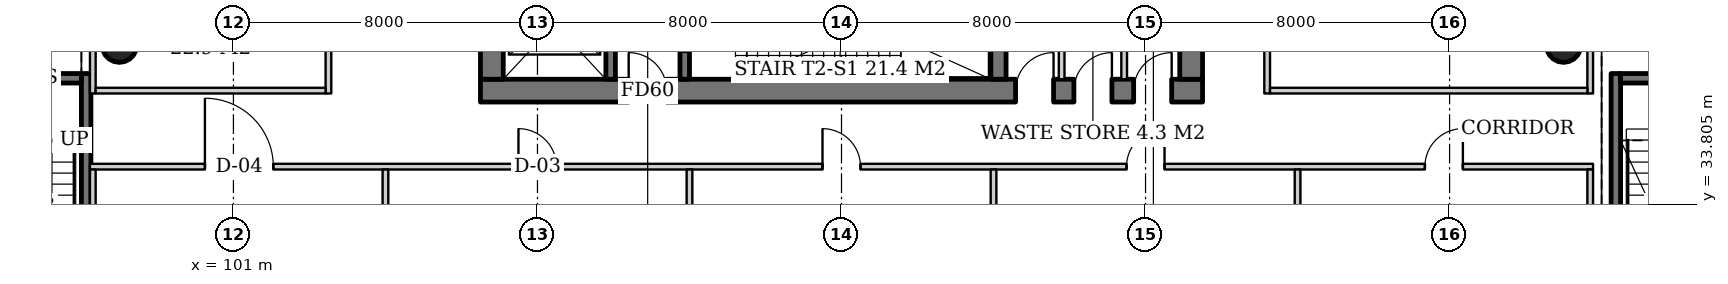
"""IFC4 building model, lengths in metres.
Left out: names, types, materials, properties, quantities, classifications, styles, units other than length and angle.
Written with IfcOpenShell. Run it as: python <this file> out.ifc"""

import sys

from ifc_helpers import new_model, si_unit, direction, frame, frame_2d, origin, origin_2d, place, context, subcontext, project, spatial, rectangle, hollow_circle, extrude, element, fill, save


model = new_model("IFC4")
c1 = context("Model", 3, precision=1e-05, world=origin(), true_north=direction((0.0, 1.0)))
c2 = subcontext(c1, "Body", "Model", "MODEL_VIEW")
j1 = project(units=[si_unit("LENGTHUNIT", "METRE"), si_unit("PLANEANGLEUNIT", "RADIAN")], contexts=[c1])
p1 = place(None, origin())
s1 = spatial("IfcSite", under=j1, at=p1, CompositionType="ELEMENT")
p2 = place(p1, origin())
s2 = spatial("IfcBuilding", under=s1, at=p2, CompositionType="ELEMENT")
p3 = place(p2, frame((0.0, 0.0, 11.0)))
s3 = spatial("IfcBuildingStorey", under=s2, at=p3, CompositionType="ELEMENT", Elevation=11.0)
for number, where, z_axis, x_axis in (
    (1, (136.0, 38.0, 0.0), (0.0, 0.0, 1.0), (1.0, 0.0, 0.0)),
    (2, (98.0, 38.0, 0.0), (0.0, 0.0, 1.0), (1.0, 0.0, 0.0)),
):
    element("IfcColumn", number, at=place(p3, frame(where, z_axis=z_axis, x_axis=x_axis)), inside=s3, PredefinedType="COLUMN", context=c2, shape_type="SweptSolid", body=[
        extrude(hollow_circle(Radius=0.457, WallThickness=0.03, at=origin_2d()), origin(), (0.0, 0.0, 1.0), 5.0),
    ])
p4 = place(p3, frame((107.5, 36.8, 0.0), z_axis=(0.0, 0.0, 1.0), x_axis=(1.0, 0.0, 0.0)))
e3 = element("IfcWall", 3, at=p4, inside=s3, PredefinedType="SHEAR", context=c2, shape_type="SweptSolid", body=[
    extrude(rectangle(XDim=19.0, YDim=0.6, at=frame_2d((9.5, 0.0))), origin(), (0.0, 0.0, 1.0), 5.0),
])
p5 = place(p4, frame((3.9, 0.0, 0.0)))
e4 = element("IfcOpeningElement", 4, at=p5, cuts=e3, PredefinedType="OPENING", context=c2, shape_type="SweptSolid", body=[
    extrude(rectangle(XDim=1.0, YDim=2.1, at=frame_2d((0.5, 1.05))), frame((0.0, 0.31, 0.0), z_axis=(0.0, -1.0, 0.0), x_axis=(1.0, 0.0, 0.0)), (0.0, 0.0, 1.0), 0.62),
])
p6 = place(p4, frame((14.08, 0.0, 0.0)))
e5 = element("IfcOpeningElement", 5, at=p6, cuts=e3, PredefinedType="OPENING", context=c2, shape_type="SweptSolid", body=[
    extrude(rectangle(XDim=1.0, YDim=2.1, at=frame_2d((0.5, 1.05))), frame((0.0, 0.31, 0.0), z_axis=(0.0, -1.0, 0.0), x_axis=(1.0, 0.0, 0.0)), (0.0, 0.0, 1.0), 0.62),
])
p7 = place(p4, frame((15.615, 0.0, 0.0)))
e6 = element("IfcOpeningElement", 6, at=p7, cuts=e3, PredefinedType="OPENING", context=c2, shape_type="SweptSolid", body=[
    extrude(rectangle(XDim=1.0, YDim=2.1, at=frame_2d((0.5, 1.05))), frame((0.0, 0.31, 0.0), z_axis=(0.0, -1.0, 0.0), x_axis=(1.0, 0.0, 0.0)), (0.0, 0.0, 1.0), 0.62),
])
p8 = place(p4, frame((17.188, 0.0, 0.0)))
e7 = element("IfcOpeningElement", 7, at=p8, cuts=e3, PredefinedType="OPENING", context=c2, shape_type="SweptSolid", body=[
    extrude(rectangle(XDim=1.0, YDim=2.1, at=frame_2d((0.5, 1.05))), frame((0.0, 0.31, 0.0), z_axis=(0.0, -1.0, 0.0), x_axis=(1.0, 0.0, 0.0)), (0.0, 0.0, 1.0), 0.62),
])
p9 = place(p3, frame((107.8, 37.1, 0.0), z_axis=(0.0, 0.0, 1.0), x_axis=(0.0, 1.0, 0.0)))
e8 = element("IfcWall", 8, at=p9, inside=s3, PredefinedType="SHEAR", context=c2, shape_type="SweptSolid", body=[
    extrude(rectangle(XDim=17.8, YDim=0.6, at=frame_2d((8.9, 0.0))), origin(), (0.0, 0.0, 1.0), 5.0),
])
p10 = place(p9, frame((8.0, 0.0, 0.0)))
e9 = element("IfcOpeningElement", 9, at=p10, cuts=e8, PredefinedType="OPENING", context=c2, shape_type="SweptSolid", body=[
    extrude(rectangle(XDim=1.8, YDim=2.4, at=frame_2d((0.9, 1.2))), frame((0.0, 0.31, 0.0), z_axis=(0.0, -1.0, 0.0), x_axis=(1.0, 0.0, 0.0)), (0.0, 0.0, 1.0), 0.62),
])
p11 = place(p3, frame((126.2, 37.1, 0.0), z_axis=(0.0, 0.0, 1.0), x_axis=(0.0, 1.0, 0.0)))
e10 = element("IfcWall", 10, at=p11, inside=s3, PredefinedType="SHEAR", context=c2, shape_type="SweptSolid", body=[
    extrude(rectangle(XDim=17.8, YDim=0.6, at=frame_2d((8.9, 0.0))), origin(), (0.0, 0.0, 1.0), 5.0),
])
p12 = place(p11, frame((8.0, 0.0, 0.0)))
e11 = element("IfcOpeningElement", 11, at=p12, cuts=e10, PredefinedType="OPENING", context=c2, shape_type="SweptSolid", body=[
    extrude(rectangle(XDim=1.8, YDim=2.4, at=frame_2d((0.9, 1.2))), frame((0.0, 0.31, 0.0), z_axis=(0.0, -1.0, 0.0), x_axis=(1.0, 0.0, 0.0)), (0.0, 0.0, 1.0), 0.62),
])
p13 = place(p3, frame((121.13, 37.1, 0.0), z_axis=(0.0, 0.0, 1.0), x_axis=(0.0, 1.0, 0.0)))
e12 = element("IfcWall", 12, at=p13, inside=s3, PredefinedType="SHEAR", context=c2, shape_type="SweptSolid", body=[
    extrude(rectangle(XDim=2.9, YDim=0.4, at=frame_2d((1.45, 0.0))), origin(), (0.0, 0.0, 1.0), 5.0),
])
p14 = place(p3, frame((110.925, 37.1, 0.0), z_axis=(0.0, 0.0, 1.0), x_axis=(0.0, 1.0, 0.0)))
e13 = element("IfcWall", 13, at=p14, inside=s3, PredefinedType="SHEAR", context=c2, shape_type="SweptSolid", body=[
    extrude(rectangle(XDim=2.9, YDim=0.25, at=frame_2d((1.45, 0.0))), origin(), (0.0, 0.0, 1.0), 5.0),
])
p15 = place(p14, frame((0.8, 0.0, 0.0)))
e14 = element("IfcOpeningElement", 14, at=p15, cuts=e13, PredefinedType="OPENING", context=c2, shape_type="SweptSolid", body=[
    extrude(rectangle(XDim=1.3, YDim=2.2, at=frame_2d((0.65, 1.1))), frame((0.0, 0.135, 0.0), z_axis=(0.0, -1.0, 0.0), x_axis=(1.0, 0.0, 0.0)), (0.0, 0.0, 1.0), 0.27),
])
p16 = place(p3, frame((112.875, 37.1, 0.0), z_axis=(0.0, 0.0, 1.0), x_axis=(0.0, 1.0, 0.0)))
e15 = element("IfcWall", 15, at=p16, inside=s3, PredefinedType="SHEAR", context=c2, shape_type="SweptSolid", body=[
    extrude(rectangle(XDim=2.9, YDim=0.25, at=frame_2d((1.45, 0.0))), origin(), (0.0, 0.0, 1.0), 5.0),
])
p17 = place(p16, frame((0.75, 0.0, 0.0)))
e16 = element("IfcOpeningElement", 16, at=p17, cuts=e15, PredefinedType="OPENING", context=c2, shape_type="SweptSolid", body=[
    extrude(rectangle(XDim=1.2, YDim=2.1, at=frame_2d((0.6, 1.05))), frame((0.0, 0.135, 0.0), z_axis=(0.0, -1.0, 0.0), x_axis=(1.0, 0.0, 0.0)), (0.0, 0.0, 1.0), 0.27),
])
for number, where, z_axis, x_axis in (
    (17, (122.792, 37.1, 0.0), (0.0, 0.0, 1.0), (0.0, 1.0, 0.0)),
    (18, (124.438, 37.1, 0.0), (0.0, 0.0, 1.0), (0.0, 1.0, 0.0)),
):
    element("IfcWall", number, at=place(p3, frame(where, z_axis=z_axis, x_axis=x_axis)), inside=s3, PredefinedType="SOLIDWALL", context=c2, shape_type="SweptSolid", body=[
        extrude(rectangle(XDim=2.9, YDim=0.15, at=frame_2d((1.45, 0.0))), origin(), (0.0, 0.0, 1.0), 4.7),
    ])
p18 = place(p3, frame((97.125, 28.75, 0.0), z_axis=(0.0, 0.0, 1.0), x_axis=(0.0, 1.0, 0.0)))
e19 = element("IfcWall", 19, at=p18, inside=s3, PredefinedType="SOLIDWALL", context=c2, shape_type="SweptSolid", body=[
    extrude(rectangle(XDim=8.5, YDim=0.25, at=frame_2d((4.25, 0.0))), origin(), (0.0, 0.0, 1.0), 4.7),
])
p19 = place(p3, frame((94.0, 37.125, 0.0), z_axis=(0.0, 0.0, 1.0), x_axis=(1.0, 0.0, 0.0)))
e20 = element("IfcWall", 20, at=p19, inside=s3, PredefinedType="SOLIDWALL", context=c2, shape_type="SweptSolid", body=[
    extrude(rectangle(XDim=3.0, YDim=0.25, at=frame_2d((1.5, 0.0))), origin(), (0.0, 0.0, 1.0), 4.7),
])
p20 = place(p19, frame((0.9, 0.0, 0.0)))
e21 = element("IfcOpeningElement", 21, at=p20, cuts=e20, PredefinedType="OPENING", context=c2, shape_type="SweptSolid", body=[
    extrude(rectangle(XDim=1.2, YDim=2.1, at=frame_2d((0.6, 1.05))), frame((0.0, 0.135, 0.0), z_axis=(0.0, -1.0, 0.0), x_axis=(1.0, 0.0, 0.0)), (0.0, 0.0, 1.0), 0.27),
])
p21 = place(p3, frame((137.375, 28.75, 0.0), z_axis=(0.0, 0.0, 1.0), x_axis=(0.0, 1.0, 0.0)))
e22 = element("IfcWall", 22, at=p21, inside=s3, PredefinedType="SOLIDWALL", context=c2, shape_type="SweptSolid", body=[
    extrude(rectangle(XDim=8.5, YDim=0.25, at=frame_2d((4.25, 0.0))), origin(), (0.0, 0.0, 1.0), 4.7),
])
p22 = place(p3, frame((137.5, 37.125, 0.0), z_axis=(0.0, 0.0, 1.0), x_axis=(1.0, 0.0, 0.0)))
e23 = element("IfcWall", 23, at=p22, inside=s3, PredefinedType="SOLIDWALL", context=c2, shape_type="SweptSolid", body=[
    extrude(rectangle(XDim=3.0, YDim=0.25, at=frame_2d((1.5, 0.0))), origin(), (0.0, 0.0, 1.0), 4.7),
])
p23 = place(p22, frame((0.9, 0.0, 0.0)))
e24 = element("IfcOpeningElement", 24, at=p23, cuts=e23, PredefinedType="OPENING", context=c2, shape_type="SweptSolid", body=[
    extrude(rectangle(XDim=1.2, YDim=2.1, at=frame_2d((0.6, 1.05))), frame((0.0, 0.135, 0.0), z_axis=(0.0, -1.0, 0.0), x_axis=(1.0, 0.0, 0.0)), (0.0, 0.0, 1.0), 0.27),
])
p24 = place(p3, frame((97.225, 34.8, 0.0), z_axis=(0.0, 0.0, 1.0), x_axis=(1.0, 0.0, 0.0)))
e25 = element("IfcWall", 25, at=p24, inside=s3, PredefinedType="PARTITIONING", context=c2, shape_type="SweptSolid", body=[
    extrude(rectangle(XDim=39.55, YDim=0.15, at=frame_2d((19.775, 0.0))), origin(), (0.0, 0.0, 1.0), 3.9),
])
p25 = place(p24, frame((3.025, 0.0, 0.0)))
e26 = element("IfcOpeningElement", 26, at=p25, cuts=e25, PredefinedType="OPENING", context=c2, shape_type="SweptSolid", body=[
    extrude(rectangle(XDim=1.8, YDim=2.4, at=frame_2d((0.9, 1.2))), frame((0.0, 0.085, 0.0), z_axis=(0.0, -1.0, 0.0), x_axis=(1.0, 0.0, 0.0)), (0.0, 0.0, 1.0), 0.17),
])
p26 = place(p24, frame((11.275, 0.0, 0.0)))
e27 = element("IfcOpeningElement", 27, at=p26, cuts=e25, PredefinedType="OPENING", context=c2, shape_type="SweptSolid", body=[
    extrude(rectangle(XDim=1.0, YDim=2.1, at=frame_2d((0.5, 1.05))), frame((0.0, 0.085, 0.0), z_axis=(0.0, -1.0, 0.0), x_axis=(1.0, 0.0, 0.0)), (0.0, 0.0, 1.0), 0.17),
])
p27 = place(p24, frame((19.275, 0.0, 0.0)))
e28 = element("IfcOpeningElement", 28, at=p27, cuts=e25, PredefinedType="OPENING", context=c2, shape_type="SweptSolid", body=[
    extrude(rectangle(XDim=1.0, YDim=2.1, at=frame_2d((0.5, 1.05))), frame((0.0, 0.085, 0.0), z_axis=(0.0, -1.0, 0.0), x_axis=(1.0, 0.0, 0.0)), (0.0, 0.0, 1.0), 0.17),
])
p28 = place(p24, frame((27.275, 0.0, 0.0)))
e29 = element("IfcOpeningElement", 29, at=p28, cuts=e25, PredefinedType="OPENING", context=c2, shape_type="SweptSolid", body=[
    extrude(rectangle(XDim=1.0, YDim=2.1, at=frame_2d((0.5, 1.05))), frame((0.0, 0.085, 0.0), z_axis=(0.0, -1.0, 0.0), x_axis=(1.0, 0.0, 0.0)), (0.0, 0.0, 1.0), 0.17),
])
p29 = place(p24, frame((35.125, 0.0, 0.0)))
e30 = element("IfcOpeningElement", 30, at=p29, cuts=e25, PredefinedType="OPENING", context=c2, shape_type="SweptSolid", body=[
    extrude(rectangle(XDim=1.0, YDim=2.1, at=frame_2d((0.5, 1.05))), frame((0.0, 0.085, 0.0), z_axis=(0.0, -1.0, 0.0), x_axis=(1.0, 0.0, 0.0)), (0.0, 0.0, 1.0), 0.17),
])
for number, where, z_axis, x_axis in (
    (31, (97.3, 21.3, 0.0), (0.0, 0.0, 1.0), (0.0, 1.0, 0.0)),
    (32, (136.7, 21.3, 0.0), (0.0, 0.0, 1.0), (0.0, 1.0, 0.0)),
):
    element("IfcWall", number, at=place(p3, frame(where, z_axis=z_axis, x_axis=x_axis)), inside=s3, PredefinedType="PARTITIONING", context=c2, shape_type="SweptSolid", body=[
        extrude(rectangle(XDim=13.425, YDim=0.15, at=frame_2d((6.712, 0.0))), origin(), (0.0, 0.0, 1.0), 4.7),
    ])
for number, where, z_axis, x_axis in (
    (33, (105.0, 21.3, 0.0), (0.0, 0.0, 1.0), (0.0, 1.0, 0.0)),
    (34, (113.0, 21.3, 0.0), (0.0, 0.0, 1.0), (0.0, 1.0, 0.0)),
    (35, (121.0, 21.3, 0.0), (0.0, 0.0, 1.0), (0.0, 1.0, 0.0)),
    (36, (129.0, 21.3, 0.0), (0.0, 0.0, 1.0), (0.0, 1.0, 0.0)),
):
    element("IfcWall", number, at=place(p3, frame(where, z_axis=z_axis, x_axis=x_axis)), inside=s3, PredefinedType="PARTITIONING", context=c2, shape_type="SweptSolid", body=[
        extrude(rectangle(XDim=13.425, YDim=0.15, at=frame_2d((6.712, 0.0))), origin(), (0.0, 0.0, 1.0), 4.15),
    ])
p30 = place(p3, frame((97.3, 36.725, 0.0), z_axis=(0.0, 0.0, 1.0), x_axis=(0.0, 1.0, 0.0)))
e37 = element("IfcWall", 37, at=p30, inside=s3, PredefinedType="PARTITIONING", context=c2, shape_type="SweptSolid", body=[
    extrude(rectangle(XDim=20.475, YDim=0.15, at=frame_2d((10.237, 0.0))), origin(), (0.0, 0.0, 1.0), 4.7),
])
p31 = place(p3, frame((103.5, 36.725, 0.0), z_axis=(0.0, 0.0, 1.0), x_axis=(0.0, 1.0, 0.0)))
e38 = element("IfcWall", 38, at=p31, inside=s3, PredefinedType="PARTITIONING", context=c2, shape_type="SweptSolid", body=[
    extrude(rectangle(XDim=20.475, YDim=0.15, at=frame_2d((10.237, 0.0))), origin(), (0.0, 0.0, 1.0), 3.9),
])
p32 = place(p31, frame((1.425, 0.0, 0.0)))
e39 = element("IfcOpeningElement", 39, at=p32, cuts=e38, PredefinedType="OPENING", context=c2, shape_type="SweptSolid", body=[
    extrude(rectangle(XDim=1.0, YDim=2.1, at=frame_2d((0.5, 1.05))), frame((0.0, 0.085, 0.0), z_axis=(0.0, -1.0, 0.0), x_axis=(1.0, 0.0, 0.0)), (0.0, 0.0, 1.0), 0.17),
])
p33 = place(p31, frame((5.275, 0.0, 0.0)))
e40 = element("IfcOpeningElement", 40, at=p33, cuts=e38, PredefinedType="OPENING", context=c2, shape_type="SweptSolid", body=[
    extrude(rectangle(XDim=1.0, YDim=2.1, at=frame_2d((0.5, 1.05))), frame((0.0, 0.085, 0.0), z_axis=(0.0, -1.0, 0.0), x_axis=(1.0, 0.0, 0.0)), (0.0, 0.0, 1.0), 0.17),
])
p34 = place(p31, frame((9.775, 0.0, 0.0)))
e41 = element("IfcOpeningElement", 41, at=p34, cuts=e38, PredefinedType="OPENING", context=c2, shape_type="SweptSolid", body=[
    extrude(rectangle(XDim=1.0, YDim=2.1, at=frame_2d((0.5, 1.05))), frame((0.0, 0.085, 0.0), z_axis=(0.0, -1.0, 0.0), x_axis=(1.0, 0.0, 0.0)), (0.0, 0.0, 1.0), 0.17),
])
p35 = place(p31, frame((14.275, 0.0, 0.0)))
e42 = element("IfcOpeningElement", 42, at=p35, cuts=e38, PredefinedType="OPENING", context=c2, shape_type="SweptSolid", body=[
    extrude(rectangle(XDim=1.0, YDim=2.1, at=frame_2d((0.5, 1.05))), frame((0.0, 0.085, 0.0), z_axis=(0.0, -1.0, 0.0), x_axis=(1.0, 0.0, 0.0)), (0.0, 0.0, 1.0), 0.17),
])
p36 = place(p31, frame((18.125, 0.0, 0.0)))
e43 = element("IfcOpeningElement", 43, at=p36, cuts=e38, PredefinedType="OPENING", context=c2, shape_type="SweptSolid", body=[
    extrude(rectangle(XDim=1.0, YDim=2.1, at=frame_2d((0.5, 1.05))), frame((0.0, 0.085, 0.0), z_axis=(0.0, -1.0, 0.0), x_axis=(1.0, 0.0, 0.0)), (0.0, 0.0, 1.0), 0.17),
])
p37 = place(p3, frame((97.375, 36.8, 0.0), z_axis=(0.0, 0.0, 1.0), x_axis=(1.0, 0.0, 0.0)))
e44 = element("IfcWall", 44, at=p37, inside=s3, PredefinedType="PARTITIONING", context=c2, shape_type="SweptSolid", body=[
    extrude(rectangle(XDim=6.05, YDim=0.15, at=frame_2d((3.025, 0.0))), origin(), (0.0, 0.0, 1.0), 4.15),
])
p38 = place(p3, frame((128.2, 36.725, 0.0), z_axis=(0.0, 0.0, 1.0), x_axis=(0.0, 1.0, 0.0)))
e45 = element("IfcWall", 45, at=p38, inside=s3, PredefinedType="PARTITIONING", context=c2, shape_type="SweptSolid", body=[
    extrude(rectangle(XDim=20.475, YDim=0.15, at=frame_2d((10.237, 0.0))), origin(), (0.0, 0.0, 1.0), 3.9),
])
p39 = place(p38, frame((1.425, 0.0, 0.0)))
e46 = element("IfcOpeningElement", 46, at=p39, cuts=e45, PredefinedType="OPENING", context=c2, shape_type="SweptSolid", body=[
    extrude(rectangle(XDim=1.0, YDim=2.1, at=frame_2d((0.5, 1.05))), frame((0.0, 0.085, 0.0), z_axis=(0.0, -1.0, 0.0), x_axis=(1.0, 0.0, 0.0)), (0.0, 0.0, 1.0), 0.17),
])
p40 = place(p38, frame((5.275, 0.0, 0.0)))
e47 = element("IfcOpeningElement", 47, at=p40, cuts=e45, PredefinedType="OPENING", context=c2, shape_type="SweptSolid", body=[
    extrude(rectangle(XDim=1.0, YDim=2.1, at=frame_2d((0.5, 1.05))), frame((0.0, 0.085, 0.0), z_axis=(0.0, -1.0, 0.0), x_axis=(1.0, 0.0, 0.0)), (0.0, 0.0, 1.0), 0.17),
])
p41 = place(p38, frame((9.775, 0.0, 0.0)))
e48 = element("IfcOpeningElement", 48, at=p41, cuts=e45, PredefinedType="OPENING", context=c2, shape_type="SweptSolid", body=[
    extrude(rectangle(XDim=1.0, YDim=2.1, at=frame_2d((0.5, 1.05))), frame((0.0, 0.085, 0.0), z_axis=(0.0, -1.0, 0.0), x_axis=(1.0, 0.0, 0.0)), (0.0, 0.0, 1.0), 0.17),
])
p42 = place(p38, frame((14.275, 0.0, 0.0)))
e49 = element("IfcOpeningElement", 49, at=p42, cuts=e45, PredefinedType="OPENING", context=c2, shape_type="SweptSolid", body=[
    extrude(rectangle(XDim=1.0, YDim=2.1, at=frame_2d((0.5, 1.05))), frame((0.0, 0.085, 0.0), z_axis=(0.0, -1.0, 0.0), x_axis=(1.0, 0.0, 0.0)), (0.0, 0.0, 1.0), 0.17),
])
p43 = place(p38, frame((18.125, 0.0, 0.0)))
e50 = element("IfcOpeningElement", 50, at=p43, cuts=e45, PredefinedType="OPENING", context=c2, shape_type="SweptSolid", body=[
    extrude(rectangle(XDim=1.0, YDim=2.1, at=frame_2d((0.5, 1.05))), frame((0.0, 0.085, 0.0), z_axis=(0.0, -1.0, 0.0), x_axis=(1.0, 0.0, 0.0)), (0.0, 0.0, 1.0), 0.17),
])
p44 = place(p3, frame((136.7, 36.725, 0.0), z_axis=(0.0, 0.0, 1.0), x_axis=(0.0, 1.0, 0.0)))
e51 = element("IfcWall", 51, at=p44, inside=s3, PredefinedType="PARTITIONING", context=c2, shape_type="SweptSolid", body=[
    extrude(rectangle(XDim=20.475, YDim=0.15, at=frame_2d((10.237, 0.0))), origin(), (0.0, 0.0, 1.0), 4.7),
])
p45 = place(p3, frame((128.275, 36.8, 0.0), z_axis=(0.0, 0.0, 1.0), x_axis=(1.0, 0.0, 0.0)))
e52 = element("IfcWall", 52, at=p45, inside=s3, PredefinedType="PARTITIONING", context=c2, shape_type="SweptSolid", body=[
    extrude(rectangle(XDim=8.35, YDim=0.15, at=frame_2d((4.175, 0.0))), origin(), (0.0, 0.0, 1.0), 3.9),
])
p46 = place(p5, origin())
e53 = element("IfcDoor", 53, at=p46, inside=s3, OperationType="SINGLE_SWING_LEFT", PredefinedType="DOOR", context=c2, shape_type="SweptSolid", body=[
    extrude(rectangle(XDim=1.0, YDim=2.1, at=frame_2d((0.5, 1.05))), frame((0.0, 0.025, 0.0), z_axis=(0.0, -1.0, 0.0), x_axis=(1.0, 0.0, 0.0)), (0.0, 0.0, 1.0), 0.05),
])
fill(e4, e53)
p47 = place(p6, origin())
e54 = element("IfcDoor", 54, at=p47, inside=s3, OperationType="SINGLE_SWING_RIGHT", PredefinedType="DOOR", context=c2, shape_type="SweptSolid", body=[
    extrude(rectangle(XDim=1.0, YDim=2.1, at=frame_2d((0.5, 1.05))), frame((0.0, 0.29, 0.0), z_axis=(0.0, -1.0, 0.0), x_axis=(1.0, 0.0, 0.0)), (0.0, 0.0, 1.0), 0.05),
])
fill(e5, e54)
p48 = place(p7, origin())
e55 = element("IfcDoor", 55, at=p48, inside=s3, OperationType="SINGLE_SWING_RIGHT", PredefinedType="DOOR", context=c2, shape_type="SweptSolid", body=[
    extrude(rectangle(XDim=1.0, YDim=2.1, at=frame_2d((0.5, 1.05))), frame((0.0, 0.29, 0.0), z_axis=(0.0, -1.0, 0.0), x_axis=(1.0, 0.0, 0.0)), (0.0, 0.0, 1.0), 0.05),
])
fill(e6, e55)
p49 = place(p8, origin())
e56 = element("IfcDoor", 56, at=p49, inside=s3, OperationType="SINGLE_SWING_RIGHT", PredefinedType="DOOR", context=c2, shape_type="SweptSolid", body=[
    extrude(rectangle(XDim=1.0, YDim=2.1, at=frame_2d((0.5, 1.05))), frame((0.0, 0.29, 0.0), z_axis=(0.0, -1.0, 0.0), x_axis=(1.0, 0.0, 0.0)), (0.0, 0.0, 1.0), 0.05),
])
fill(e7, e56)
p50 = place(p25, origin())
e57 = element("IfcDoor", 57, at=p50, inside=s3, OperationType="DOUBLE_DOOR_SINGLE_SWING", PredefinedType="DOOR", context=c2, shape_type="SweptSolid", body=[
    extrude(rectangle(XDim=1.8, YDim=2.4, at=frame_2d((0.9, 1.2))), frame((0.0, 0.025, 0.0), z_axis=(0.0, -1.0, 0.0), x_axis=(1.0, 0.0, 0.0)), (0.0, 0.0, 1.0), 0.05),
])
fill(e26, e57)
p51 = place(p26, origin())
e58 = element("IfcDoor", 58, at=p51, inside=s3, OperationType="SINGLE_SWING_LEFT", PredefinedType="DOOR", context=c2, shape_type="SweptSolid", body=[
    extrude(rectangle(XDim=1.0, YDim=2.1, at=frame_2d((0.5, 1.05))), frame((0.0, 0.025, 0.0), z_axis=(0.0, -1.0, 0.0), x_axis=(1.0, 0.0, 0.0)), (0.0, 0.0, 1.0), 0.05),
])
fill(e27, e58)
p52 = place(p27, origin())
e59 = element("IfcDoor", 59, at=p52, inside=s3, OperationType="SINGLE_SWING_LEFT", PredefinedType="DOOR", context=c2, shape_type="SweptSolid", body=[
    extrude(rectangle(XDim=1.0, YDim=2.1, at=frame_2d((0.5, 1.05))), frame((0.0, 0.025, 0.0), z_axis=(0.0, -1.0, 0.0), x_axis=(1.0, 0.0, 0.0)), (0.0, 0.0, 1.0), 0.05),
])
fill(e28, e59)
p53 = place(p28, origin())
e60 = element("IfcDoor", 60, at=p53, inside=s3, OperationType="SINGLE_SWING_RIGHT", PredefinedType="DOOR", context=c2, shape_type="SweptSolid", body=[
    extrude(rectangle(XDim=1.0, YDim=2.1, at=frame_2d((0.5, 1.05))), frame((0.0, 0.025, 0.0), z_axis=(0.0, -1.0, 0.0), x_axis=(1.0, 0.0, 0.0)), (0.0, 0.0, 1.0), 0.05),
])
fill(e29, e60)
p54 = place(p29, origin())
e61 = element("IfcDoor", 61, at=p54, inside=s3, OperationType="SINGLE_SWING_RIGHT", PredefinedType="DOOR", context=c2, shape_type="SweptSolid", body=[
    extrude(rectangle(XDim=1.0, YDim=2.1, at=frame_2d((0.5, 1.05))), frame((0.0, 0.025, 0.0), z_axis=(0.0, -1.0, 0.0), x_axis=(1.0, 0.0, 0.0)), (0.0, 0.0, 1.0), 0.05),
])
fill(e30, e61)
save(model, sys.argv[1])
